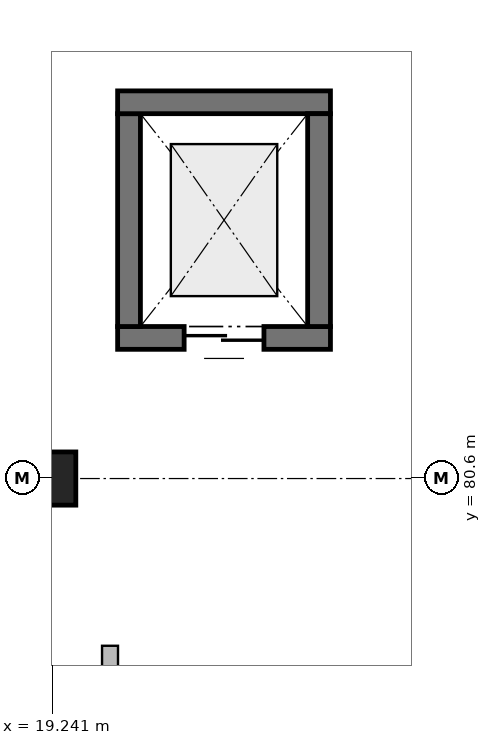
"""IFC4 building model, lengths in metres.
Left out: names, types, materials, properties, quantities, classifications, styles, units other than length and angle.
Written with IfcOpenShell. Run it as: python <this file> out.ifc"""

import sys

from ifc_helpers import new_model, si_unit, direction, frame, frame_2d, origin, origin_2d, place, context, subcontext, project, spatial, rectangle, extrude, element, fill, save


model = new_model("IFC4")
c1 = context("Model", 3, precision=1e-05, world=origin(), true_north=direction((0.0, 1.0)))
c2 = subcontext(c1, "Body", "Model", "MODEL_VIEW")
j1 = project(units=[si_unit("LENGTHUNIT", "METRE"), si_unit("PLANEANGLEUNIT", "RADIAN")], contexts=[c1])
p1 = place(None, origin())
s1 = spatial("IfcSite", under=j1, at=p1, CompositionType="ELEMENT")
p2 = place(p1, origin())
s2 = spatial("IfcBuilding", under=s1, at=p2, CompositionType="ELEMENT")
p3 = place(p2, origin())
s3 = spatial("IfcBuildingStorey", under=s2, at=p3, CompositionType="ELEMENT", Elevation=0.0)
p4 = place(p3, frame((19.2, 80.6, 0.0), z_axis=(0.0, 0.0, 1.0), x_axis=(1.0, 0.0, 0.0)))
e1 = element("IfcColumn", 1, at=p4, inside=s3, PredefinedType="COLUMN", context=c2, shape_type="SweptSolid", body=[
    extrude(rectangle(XDim=0.7, YDim=0.7, at=origin_2d()), origin(), (0.0, 0.0, 1.0), 4.8),
])
p5 = place(p3, frame((22.9, 82.45, 0.0), z_axis=(0.0, 0.0, 1.0), x_axis=(-1.0, 0.0, 0.0)))
e2 = element("IfcWall", 2, at=p5, inside=s3, PredefinedType="SOLIDWALL", context=c2, shape_type="SweptSolid", body=[
    extrude(rectangle(XDim=2.8, YDim=0.3, at=frame_2d((1.4, 0.0))), origin(), (0.0, 0.0, 1.0), 4.8),
])
p6 = place(p5, frame((0.875, 0.0, 0.0)))
e3 = element("IfcOpeningElement", 3, at=p6, cuts=e2, PredefinedType="OPENING", context=c2, shape_type="SweptSolid", body=[
    extrude(rectangle(XDim=1.05, YDim=2.15, at=frame_2d((0.525, 1.075))), frame((0.0, 0.17, 0.0), z_axis=(0.0, -1.0, 0.0), x_axis=(1.0, 0.0, 0.0)), (0.0, 0.0, 1.0), 0.34),
])
for number, where, z_axis, x_axis in (
    (4, (20.25, 82.6, 0.0), (0.0, 0.0, 1.0), (0.0, 1.0, 0.0)),
    (5, (20.1, 85.55, 0.0), (0.0, 0.0, 1.0), (1.0, 0.0, 0.0)),
    (6, (22.75, 85.4, 0.0), (0.0, 0.0, 1.0), (0.0, -1.0, 0.0)),
):
    element("IfcWall", number, at=place(p3, frame(where, z_axis=z_axis, x_axis=x_axis)), inside=s3, PredefinedType="SOLIDWALL", context=c2, shape_type="SweptSolid", body=[
        extrude(rectangle(XDim=2.8, YDim=0.3, at=frame_2d((1.4, 0.0))), origin(), (0.0, 0.0, 1.0), 4.8),
    ])
p7 = place(p3, frame((20.0, 73.54, 0.0), z_axis=(0.0, 0.0, 1.0), x_axis=(0.0, 1.0, 0.0)))
e7 = element("IfcWall", 7, at=p7, inside=s3, PredefinedType="PARTITIONING", context=c2, shape_type="SweptSolid", body=[
    extrude(rectangle(XDim=4.86, YDim=0.21, at=frame_2d((2.43, 0.0))), origin(), (0.0, 0.0, 1.0), 4.54),
])
p8 = place(p6, origin())
e8 = element("IfcDoor", 8, at=p8, inside=s3, OperationType="DOUBLE_DOOR_SLIDING", PredefinedType="DOOR", context=c2, shape_type="SweptSolid", body=[
    extrude(rectangle(XDim=1.05, YDim=2.15, at=frame_2d((0.525, 1.075))), frame((0.0, 0.025, 0.0), z_axis=(0.0, -1.0, 0.0), x_axis=(1.0, 0.0, 0.0)), (0.0, 0.0, 1.0), 0.05),
])
fill(e3, e8)
save(model, sys.argv[1])
